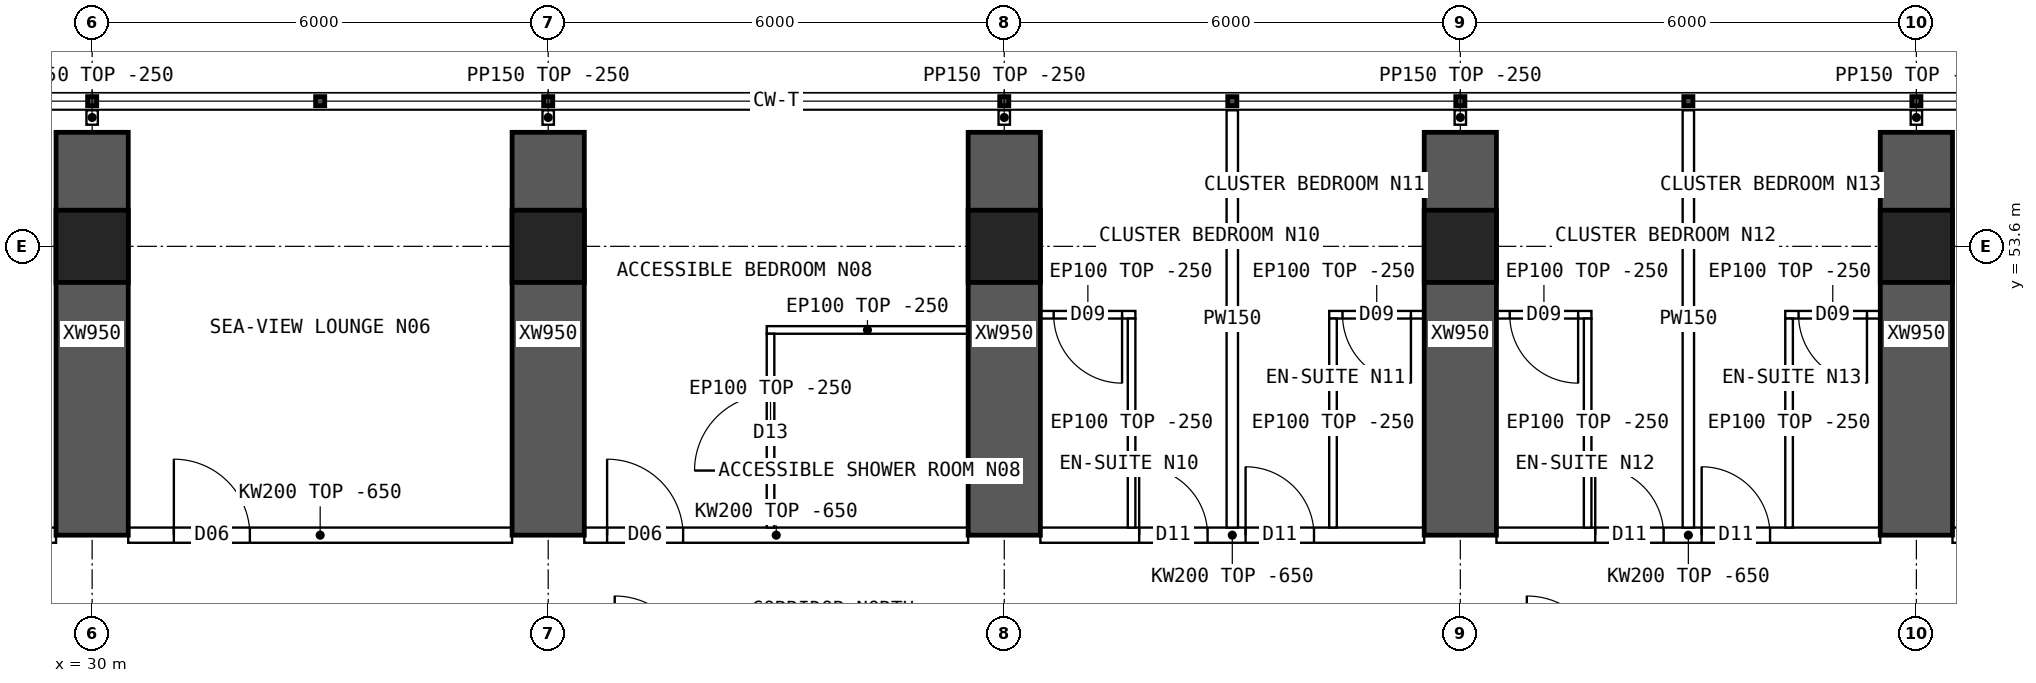
"""IFC4 building model, lengths in metres.
Left out: names, types, materials, properties, quantities, classifications, styles, units other than length and angle.
Written with IfcOpenShell. Run it as: python <this file> out.ifc"""

import sys

from ifc_helpers import new_model, si_unit, direction, frame, frame_2d, origin, origin_2d, place, context, subcontext, project, spatial, polyline, rectangle, hollow_rectangle, outline, extrude, element, fill, save


model = new_model("IFC4")
c1 = context("Model", 3, precision=1e-05, world=origin(), true_north=direction((0.0, 1.0)))
c2 = subcontext(c1, "Body", "Model", "MODEL_VIEW")
j1 = project(units=[si_unit("LENGTHUNIT", "METRE"), si_unit("PLANEANGLEUNIT", "RADIAN")], contexts=[c1])
p1 = place(None, origin())
s1 = spatial("IfcSite", under=j1, at=p1, CompositionType="ELEMENT")
p2 = place(p1, origin())
s2 = spatial("IfcBuilding", under=s1, at=p2, CompositionType="ELEMENT")
p3 = place(p2, frame((0.0, 0.0, 106.9)))
s3 = spatial("IfcBuildingStorey", under=s2, at=p3, CompositionType="ELEMENT", Elevation=106.9)
for number, where, z_axis, x_axis in (
    (1, (30.0, 53.6, 0.0), (0.0, 0.0, 1.0), (1.0, 0.0, 0.0)),
    (2, (36.0, 53.6, 0.0), (0.0, 0.0, 1.0), (1.0, 0.0, 0.0)),
    (3, (42.0, 53.6, 0.0), (0.0, 0.0, 1.0), (1.0, 0.0, 0.0)),
    (4, (48.0, 53.6, 0.0), (0.0, 0.0, 1.0), (1.0, 0.0, 0.0)),
    (5, (54.0, 53.6, 0.0), (0.0, 0.0, 1.0), (1.0, 0.0, 0.0)),
):
    element("IfcColumn", number, at=place(p3, frame(where, z_axis=z_axis, x_axis=x_axis)), inside=s3, PredefinedType="COLUMN", context=c2, shape_type="SweptSolid", body=[
        extrude(hollow_rectangle(XDim=0.95, YDim=0.95, WallThickness=0.095, at=origin_2d()), origin(), (0.0, 0.0, 1.0), 3.75),
    ])
for number, where, z_axis, x_axis in (
    (6, (30.0, 49.8, 0.0), (0.0, 0.0, 1.0), (0.0, 1.0, 0.0)),
    (7, (36.0, 49.8, 0.0), (0.0, 0.0, 1.0), (0.0, 1.0, 0.0)),
    (8, (42.0, 49.8, 0.0), (0.0, 0.0, 1.0), (0.0, 1.0, 0.0)),
    (9, (48.0, 49.8, 0.0), (0.0, 0.0, 1.0), (0.0, 1.0, 0.0)),
    (10, (54.0, 49.8, 0.0), (0.0, 0.0, 1.0), (0.0, 1.0, 0.0)),
):
    element("IfcWall", number, at=place(p3, frame(where, z_axis=z_axis, x_axis=x_axis)), inside=s3, PredefinedType="SHEAR", context=c2, shape_type="SweptSolid", body=[
        extrude(rectangle(XDim=5.3, YDim=0.95, at=frame_2d((2.65, 0.0))), origin(), (0.0, 0.0, 1.0), 3.75),
    ])
p4 = place(p3, frame((24.475, 49.8, 0.0), z_axis=(0.0, 0.0, 1.0), x_axis=(1.0, 0.0, 0.0)))
e11 = element("IfcWall", 11, at=p4, inside=s3, PredefinedType="SOLIDWALL", context=c2, shape_type="SweptSolid", body=[
    extrude(outline(polyline([(0.0, 0.0), (5.05, 0.0), (5.05, 3.1), (0.0, 3.1), (0.0, 0.0)])), frame((0.0, 0.1, 0.0), z_axis=(0.0, -1.0, 0.0), x_axis=(1.0, 0.0, 0.0)), (0.0, 0.0, 1.0), 0.2),
])
p5 = place(p4, frame((0.6, 0.0, 0.0)))
e12 = element("IfcOpeningElement", 12, at=p5, cuts=e11, PredefinedType="OPENING", context=c2, shape_type="SweptSolid", body=[
    extrude(rectangle(XDim=1.0, YDim=2.1, at=frame_2d((0.5, 1.05))), frame((0.0, 0.11, 0.0), z_axis=(0.0, -1.0, 0.0), x_axis=(1.0, 0.0, 0.0)), (0.0, 0.0, 1.0), 0.22),
])
p6 = place(p3, frame((30.475, 49.8, 0.0), z_axis=(0.0, 0.0, 1.0), x_axis=(1.0, 0.0, 0.0)))
e13 = element("IfcWall", 13, at=p6, inside=s3, PredefinedType="SOLIDWALL", context=c2, shape_type="SweptSolid", body=[
    extrude(outline(polyline([(0.0, 0.0), (5.05, 0.0), (5.05, 3.1), (0.0, 3.1), (0.0, 0.0)])), frame((0.0, 0.1, 0.0), z_axis=(0.0, -1.0, 0.0), x_axis=(1.0, 0.0, 0.0)), (0.0, 0.0, 1.0), 0.2),
])
p7 = place(p6, frame((0.6, 0.0, 0.0)))
e14 = element("IfcOpeningElement", 14, at=p7, cuts=e13, PredefinedType="OPENING", context=c2, shape_type="SweptSolid", body=[
    extrude(rectangle(XDim=1.0, YDim=2.1, at=frame_2d((0.5, 1.05))), frame((0.0, 0.11, 0.0), z_axis=(0.0, -1.0, 0.0), x_axis=(1.0, 0.0, 0.0)), (0.0, 0.0, 1.0), 0.22),
])
p8 = place(p3, frame((36.475, 49.8, 0.0), z_axis=(0.0, 0.0, 1.0), x_axis=(1.0, 0.0, 0.0)))
e15 = element("IfcWall", 15, at=p8, inside=s3, PredefinedType="SOLIDWALL", context=c2, shape_type="SweptSolid", body=[
    extrude(outline(polyline([(0.0, 0.0), (5.05, 0.0), (5.05, 3.1), (0.0, 3.1), (0.0, 0.0)])), frame((0.0, 0.1, 0.0), z_axis=(0.0, -1.0, 0.0), x_axis=(1.0, 0.0, 0.0)), (0.0, 0.0, 1.0), 0.2),
])
p9 = place(p8, frame((0.3, 0.0, 0.0)))
e16 = element("IfcOpeningElement", 16, at=p9, cuts=e15, PredefinedType="OPENING", context=c2, shape_type="SweptSolid", body=[
    extrude(rectangle(XDim=1.0, YDim=2.1, at=frame_2d((0.5, 1.05))), frame((0.0, 0.11, 0.0), z_axis=(0.0, -1.0, 0.0), x_axis=(1.0, 0.0, 0.0)), (0.0, 0.0, 1.0), 0.22),
])
p10 = place(p3, frame((42.475, 49.8, 0.0), z_axis=(0.0, 0.0, 1.0), x_axis=(1.0, 0.0, 0.0)))
e17 = element("IfcWall", 17, at=p10, inside=s3, PredefinedType="SOLIDWALL", context=c2, shape_type="SweptSolid", body=[
    extrude(outline(polyline([(0.0, 0.0), (5.05, 0.0), (5.05, 3.1), (0.0, 3.1), (0.0, 0.0)])), frame((0.0, 0.1, 0.0), z_axis=(0.0, -1.0, 0.0), x_axis=(1.0, 0.0, 0.0)), (0.0, 0.0, 1.0), 0.2),
])
p11 = place(p10, frame((1.3, 0.0, 0.0)))
e18 = element("IfcOpeningElement", 18, at=p11, cuts=e17, PredefinedType="OPENING", context=c2, shape_type="SweptSolid", body=[
    extrude(rectangle(XDim=0.9, YDim=2.1, at=frame_2d((0.45, 1.05))), frame((0.0, 0.11, 0.0), z_axis=(0.0, -1.0, 0.0), x_axis=(1.0, 0.0, 0.0)), (0.0, 0.0, 1.0), 0.22),
])
p12 = place(p10, frame((2.7, 0.0, 0.0)))
e19 = element("IfcOpeningElement", 19, at=p12, cuts=e17, PredefinedType="OPENING", context=c2, shape_type="SweptSolid", body=[
    extrude(rectangle(XDim=0.9, YDim=2.1, at=frame_2d((0.45, 1.05))), frame((0.0, 0.11, 0.0), z_axis=(0.0, -1.0, 0.0), x_axis=(1.0, 0.0, 0.0)), (0.0, 0.0, 1.0), 0.22),
])
p13 = place(p3, frame((48.475, 49.8, 0.0), z_axis=(0.0, 0.0, 1.0), x_axis=(1.0, 0.0, 0.0)))
e20 = element("IfcWall", 20, at=p13, inside=s3, PredefinedType="SOLIDWALL", context=c2, shape_type="SweptSolid", body=[
    extrude(outline(polyline([(0.0, 0.0), (5.05, 0.0), (5.05, 3.1), (0.0, 3.1), (0.0, 0.0)])), frame((0.0, 0.1, 0.0), z_axis=(0.0, -1.0, 0.0), x_axis=(1.0, 0.0, 0.0)), (0.0, 0.0, 1.0), 0.2),
])
p14 = place(p13, frame((1.3, 0.0, 0.0)))
e21 = element("IfcOpeningElement", 21, at=p14, cuts=e20, PredefinedType="OPENING", context=c2, shape_type="SweptSolid", body=[
    extrude(rectangle(XDim=0.9, YDim=2.1, at=frame_2d((0.45, 1.05))), frame((0.0, 0.11, 0.0), z_axis=(0.0, -1.0, 0.0), x_axis=(1.0, 0.0, 0.0)), (0.0, 0.0, 1.0), 0.22),
])
p15 = place(p13, frame((2.7, 0.0, 0.0)))
e22 = element("IfcOpeningElement", 22, at=p15, cuts=e20, PredefinedType="OPENING", context=c2, shape_type="SweptSolid", body=[
    extrude(rectangle(XDim=0.9, YDim=2.1, at=frame_2d((0.45, 1.05))), frame((0.0, 0.11, 0.0), z_axis=(0.0, -1.0, 0.0), x_axis=(1.0, 0.0, 0.0)), (0.0, 0.0, 1.0), 0.22),
])
p16 = place(p3, frame((54.475, 49.8, 0.0), z_axis=(0.0, 0.0, 1.0), x_axis=(1.0, 0.0, 0.0)))
e23 = element("IfcWall", 23, at=p16, inside=s3, PredefinedType="SOLIDWALL", context=c2, shape_type="SweptSolid", body=[
    extrude(outline(polyline([(0.0, 0.0), (5.05, 0.0), (5.05, 3.1), (0.0, 3.1), (0.0, 0.0)])), frame((0.0, 0.1, 0.0), z_axis=(0.0, -1.0, 0.0), x_axis=(1.0, 0.0, 0.0)), (0.0, 0.0, 1.0), 0.2),
])
p17 = place(p16, frame((0.6, 0.0, 0.0)))
e24 = element("IfcOpeningElement", 24, at=p17, cuts=e23, PredefinedType="OPENING", context=c2, shape_type="SweptSolid", body=[
    extrude(rectangle(XDim=1.0, YDim=2.1, at=frame_2d((0.5, 1.05))), frame((0.0, 0.11, 0.0), z_axis=(0.0, -1.0, 0.0), x_axis=(1.0, 0.0, 0.0)), (0.0, 0.0, 1.0), 0.22),
])
p18 = place(p3, frame((38.875, 52.5, 0.0), z_axis=(0.0, 0.0, 1.0), x_axis=(1.0, 0.0, 0.0)))
e25 = element("IfcWall", 25, at=p18, inside=s3, PredefinedType="PARTITIONING", context=c2, shape_type="SweptSolid", body=[
    extrude(rectangle(XDim=2.65, YDim=0.1, at=frame_2d((1.325, 0.0))), origin(), (0.0, 0.0, 1.0), 3.5),
])
p19 = place(p3, frame((38.925, 52.45, 0.0), z_axis=(0.0, 0.0, 1.0), x_axis=(0.0, -1.0, 0.0)))
e26 = element("IfcWall", 26, at=p19, inside=s3, PredefinedType="PARTITIONING", context=c2, shape_type="SweptSolid", body=[
    extrude(outline(polyline([(0.0, 0.0), (2.55, 0.0), (2.55, 3.1), (2.502, 3.1), (2.5, 3.5), (0.0, 3.5), (0.0, 0.0)])), frame((0.0, 0.05, 0.0), z_axis=(0.0, -1.0, 0.0), x_axis=(1.0, 0.0, 0.0)), (0.0, 0.0, 1.0), 0.1),
])
p20 = place(p19, frame((0.8, 0.0, 0.0)))
e27 = element("IfcOpeningElement", 27, at=p20, cuts=e26, PredefinedType="OPENING", context=c2, shape_type="SweptSolid", body=[
    extrude(rectangle(XDim=1.0, YDim=2.1, at=frame_2d((0.5, 1.05))), frame((0.0, 0.06, 0.0), z_axis=(0.0, -1.0, 0.0), x_axis=(1.0, 0.0, 0.0)), (0.0, 0.0, 1.0), 0.12),
])
p21 = place(p3, frame((45.0, 55.39, 0.0), z_axis=(0.0, 0.0, 1.0), x_axis=(0.0, -1.0, 0.0)))
e28 = element("IfcWall", 28, at=p21, inside=s3, PredefinedType="PARTITIONING", context=c2, shape_type="SweptSolid", body=[
    extrude(outline(polyline([(0.0, 0.0), (5.49, 0.0), (5.49, 3.1), (5.442, 3.1), (5.44, 3.5), (1.992, 3.5), (1.99, 3.1), (1.592, 3.1), (1.59, 3.5), (0.0, 3.5), (0.0, 0.0)])), frame((0.0, 0.075, 0.0), z_axis=(0.0, -1.0, 0.0), x_axis=(1.0, 0.0, 0.0)), (0.0, 0.0, 1.0), 0.15),
])
p22 = place(p3, frame((42.475, 52.7, 0.0), z_axis=(0.0, 0.0, 1.0), x_axis=(1.0, 0.0, 0.0)))
e29 = element("IfcWall", 29, at=p22, inside=s3, PredefinedType="PARTITIONING", context=c2, shape_type="SweptSolid", body=[
    extrude(rectangle(XDim=1.25, YDim=0.1, at=frame_2d((0.625, 0.0))), origin(), (0.0, 0.0, 1.0), 3.5),
])
p23 = place(p22, frame((0.175, 0.0, 0.0)))
e30 = element("IfcOpeningElement", 30, at=p23, cuts=e29, PredefinedType="OPENING", context=c2, shape_type="SweptSolid", body=[
    extrude(rectangle(XDim=0.9, YDim=2.1, at=frame_2d((0.45, 1.05))), frame((0.0, 0.06, 0.0), z_axis=(0.0, -1.0, 0.0), x_axis=(1.0, 0.0, 0.0)), (0.0, 0.0, 1.0), 0.12),
])
p24 = place(p3, frame((43.675, 52.65, 0.0), z_axis=(0.0, 0.0, 1.0), x_axis=(0.0, -1.0, 0.0)))
e31 = element("IfcWall", 31, at=p24, inside=s3, PredefinedType="PARTITIONING", context=c2, shape_type="SweptSolid", body=[
    extrude(outline(polyline([(0.0, 0.0), (2.75, 0.0), (2.75, 3.1), (2.702, 3.1), (2.7, 3.5), (0.0, 3.5), (0.0, 0.0)])), frame((0.0, 0.05, 0.0), z_axis=(0.0, -1.0, 0.0), x_axis=(1.0, 0.0, 0.0)), (0.0, 0.0, 1.0), 0.1),
])
p25 = place(p3, frame((46.275, 52.7, 0.0), z_axis=(0.0, 0.0, 1.0), x_axis=(1.0, 0.0, 0.0)))
e32 = element("IfcWall", 32, at=p25, inside=s3, PredefinedType="PARTITIONING", context=c2, shape_type="SweptSolid", body=[
    extrude(rectangle(XDim=1.25, YDim=0.1, at=frame_2d((0.625, 0.0))), origin(), (0.0, 0.0, 1.0), 3.5),
])
p26 = place(p25, frame((0.175, 0.0, 0.0)))
e33 = element("IfcOpeningElement", 33, at=p26, cuts=e32, PredefinedType="OPENING", context=c2, shape_type="SweptSolid", body=[
    extrude(rectangle(XDim=0.9, YDim=2.1, at=frame_2d((0.45, 1.05))), frame((0.0, 0.06, 0.0), z_axis=(0.0, -1.0, 0.0), x_axis=(1.0, 0.0, 0.0)), (0.0, 0.0, 1.0), 0.12),
])
p27 = place(p3, frame((46.325, 52.65, 0.0), z_axis=(0.0, 0.0, 1.0), x_axis=(0.0, -1.0, 0.0)))
e34 = element("IfcWall", 34, at=p27, inside=s3, PredefinedType="PARTITIONING", context=c2, shape_type="SweptSolid", body=[
    extrude(outline(polyline([(0.0, 0.0), (2.75, 0.0), (2.75, 3.1), (2.702, 3.1), (2.7, 3.5), (0.0, 3.5), (0.0, 0.0)])), frame((0.0, 0.05, 0.0), z_axis=(0.0, -1.0, 0.0), x_axis=(1.0, 0.0, 0.0)), (0.0, 0.0, 1.0), 0.1),
])
p28 = place(p3, frame((51.0, 55.39, 0.0), z_axis=(0.0, 0.0, 1.0), x_axis=(0.0, -1.0, 0.0)))
e35 = element("IfcWall", 35, at=p28, inside=s3, PredefinedType="PARTITIONING", context=c2, shape_type="SweptSolid", body=[
    extrude(outline(polyline([(0.0, 0.0), (5.49, 0.0), (5.49, 3.1), (5.442, 3.1), (5.44, 3.5), (1.992, 3.5), (1.99, 3.1), (1.592, 3.1), (1.59, 3.5), (0.0, 3.5), (0.0, 0.0)])), frame((0.0, 0.075, 0.0), z_axis=(0.0, -1.0, 0.0), x_axis=(1.0, 0.0, 0.0)), (0.0, 0.0, 1.0), 0.15),
])
p29 = place(p3, frame((48.475, 52.7, 0.0), z_axis=(0.0, 0.0, 1.0), x_axis=(1.0, 0.0, 0.0)))
e36 = element("IfcWall", 36, at=p29, inside=s3, PredefinedType="PARTITIONING", context=c2, shape_type="SweptSolid", body=[
    extrude(rectangle(XDim=1.25, YDim=0.1, at=frame_2d((0.625, 0.0))), origin(), (0.0, 0.0, 1.0), 3.5),
])
p30 = place(p29, frame((0.175, 0.0, 0.0)))
e37 = element("IfcOpeningElement", 37, at=p30, cuts=e36, PredefinedType="OPENING", context=c2, shape_type="SweptSolid", body=[
    extrude(rectangle(XDim=0.9, YDim=2.1, at=frame_2d((0.45, 1.05))), frame((0.0, 0.06, 0.0), z_axis=(0.0, -1.0, 0.0), x_axis=(1.0, 0.0, 0.0)), (0.0, 0.0, 1.0), 0.12),
])
p31 = place(p3, frame((49.675, 52.65, 0.0), z_axis=(0.0, 0.0, 1.0), x_axis=(0.0, -1.0, 0.0)))
e38 = element("IfcWall", 38, at=p31, inside=s3, PredefinedType="PARTITIONING", context=c2, shape_type="SweptSolid", body=[
    extrude(outline(polyline([(0.0, 0.0), (2.75, 0.0), (2.75, 3.1), (2.702, 3.1), (2.7, 3.5), (0.0, 3.5), (0.0, 0.0)])), frame((0.0, 0.05, 0.0), z_axis=(0.0, -1.0, 0.0), x_axis=(1.0, 0.0, 0.0)), (0.0, 0.0, 1.0), 0.1),
])
p32 = place(p3, frame((52.275, 52.7, 0.0), z_axis=(0.0, 0.0, 1.0), x_axis=(1.0, 0.0, 0.0)))
e39 = element("IfcWall", 39, at=p32, inside=s3, PredefinedType="PARTITIONING", context=c2, shape_type="SweptSolid", body=[
    extrude(rectangle(XDim=1.25, YDim=0.1, at=frame_2d((0.625, 0.0))), origin(), (0.0, 0.0, 1.0), 3.5),
])
p33 = place(p32, frame((0.175, 0.0, 0.0)))
e40 = element("IfcOpeningElement", 40, at=p33, cuts=e39, PredefinedType="OPENING", context=c2, shape_type="SweptSolid", body=[
    extrude(rectangle(XDim=0.9, YDim=2.1, at=frame_2d((0.45, 1.05))), frame((0.0, 0.06, 0.0), z_axis=(0.0, -1.0, 0.0), x_axis=(1.0, 0.0, 0.0)), (0.0, 0.0, 1.0), 0.12),
])
p34 = place(p3, frame((52.325, 52.65, 0.0), z_axis=(0.0, 0.0, 1.0), x_axis=(0.0, -1.0, 0.0)))
e41 = element("IfcWall", 41, at=p34, inside=s3, PredefinedType="PARTITIONING", context=c2, shape_type="SweptSolid", body=[
    extrude(outline(polyline([(0.0, 0.0), (2.75, 0.0), (2.75, 3.1), (2.702, 3.1), (2.7, 3.5), (0.0, 3.5), (0.0, 0.0)])), frame((0.0, 0.05, 0.0), z_axis=(0.0, -1.0, 0.0), x_axis=(1.0, 0.0, 0.0)), (0.0, 0.0, 1.0), 0.1),
])
for number, where, z_axis, x_axis in (
    (42, (30.0, 55.2, 0.0), (0.0, 0.0, 1.0), (0.0, 1.0, 0.0)),
    (43, (36.0, 55.2, 0.0), (0.0, 0.0, 1.0), (0.0, 1.0, 0.0)),
    (44, (42.0, 55.2, 0.0), (0.0, 0.0, 1.0), (0.0, 1.0, 0.0)),
    (45, (48.0, 55.2, 0.0), (0.0, 0.0, 1.0), (0.0, 1.0, 0.0)),
    (46, (54.0, 55.2, 0.0), (0.0, 0.0, 1.0), (0.0, 1.0, 0.0)),
):
    element("IfcWall", number, at=place(p3, frame(where, z_axis=z_axis, x_axis=x_axis)), inside=s3, PredefinedType="PARTITIONING", context=c2, shape_type="SweptSolid", body=[
        extrude(rectangle(XDim=0.19, YDim=0.15, at=frame_2d((0.095, 0.0))), origin(), (0.0, 0.0, 1.0), 3.5),
    ])
p35 = place(p7, origin())
e47 = element("IfcDoor", 47, at=p35, inside=s3, OperationType="SINGLE_SWING_LEFT", PredefinedType="DOOR", context=c2, shape_type="SweptSolid", body=[
    extrude(rectangle(XDim=1.0, YDim=2.1, at=frame_2d((0.5, 1.05))), frame((0.0, 0.025, 0.0), z_axis=(0.0, -1.0, 0.0), x_axis=(1.0, 0.0, 0.0)), (0.0, 0.0, 1.0), 0.05),
])
fill(e14, e47)
p36 = place(p20, origin())
e48 = element("IfcDoor", 48, at=p36, inside=s3, OperationType="SINGLE_SWING_RIGHT", PredefinedType="DOOR", context=c2, shape_type="SweptSolid", body=[
    extrude(rectangle(XDim=1.0, YDim=2.1, at=frame_2d((0.5, 1.05))), frame((0.0, 0.025, 0.0), z_axis=(0.0, -1.0, 0.0), x_axis=(1.0, 0.0, 0.0)), (0.0, 0.0, 1.0), 0.05),
])
fill(e27, e48)
p37 = place(p9, origin())
e49 = element("IfcDoor", 49, at=p37, inside=s3, OperationType="SINGLE_SWING_LEFT", PredefinedType="DOOR", context=c2, shape_type="SweptSolid", body=[
    extrude(rectangle(XDim=1.0, YDim=2.1, at=frame_2d((0.5, 1.05))), frame((0.0, 0.025, 0.0), z_axis=(0.0, -1.0, 0.0), x_axis=(1.0, 0.0, 0.0)), (0.0, 0.0, 1.0), 0.05),
])
fill(e16, e49)
p38 = place(p23, origin())
e50 = element("IfcDoor", 50, at=p38, inside=s3, OperationType="SINGLE_SWING_RIGHT", PredefinedType="DOOR", context=c2, shape_type="SweptSolid", body=[
    extrude(rectangle(XDim=0.9, YDim=2.1, at=frame_2d((0.45, 1.05))), frame((0.0, 0.025, 0.0), z_axis=(0.0, -1.0, 0.0), x_axis=(1.0, 0.0, 0.0)), (0.0, 0.0, 1.0), 0.05),
])
fill(e30, e50)
p39 = place(p11, origin())
e51 = element("IfcDoor", 51, at=p39, inside=s3, OperationType="SINGLE_SWING_LEFT", PredefinedType="DOOR", context=c2, shape_type="SweptSolid", body=[
    extrude(rectangle(XDim=0.9, YDim=2.1, at=frame_2d((0.45, 1.05))), frame((0.0, 0.025, 0.0), z_axis=(0.0, -1.0, 0.0), x_axis=(1.0, 0.0, 0.0)), (0.0, 0.0, 1.0), 0.05),
])
fill(e18, e51)
p40 = place(p26, origin())
e52 = element("IfcDoor", 52, at=p40, inside=s3, OperationType="SINGLE_SWING_RIGHT", PredefinedType="DOOR", context=c2, shape_type="SweptSolid", body=[
    extrude(rectangle(XDim=0.9, YDim=2.1, at=frame_2d((0.45, 1.05))), frame((0.0, 0.025, 0.0), z_axis=(0.0, -1.0, 0.0), x_axis=(1.0, 0.0, 0.0)), (0.0, 0.0, 1.0), 0.05),
])
fill(e33, e52)
p41 = place(p12, origin())
e53 = element("IfcDoor", 53, at=p41, inside=s3, OperationType="SINGLE_SWING_LEFT", PredefinedType="DOOR", context=c2, shape_type="SweptSolid", body=[
    extrude(rectangle(XDim=0.9, YDim=2.1, at=frame_2d((0.45, 1.05))), frame((0.0, 0.025, 0.0), z_axis=(0.0, -1.0, 0.0), x_axis=(1.0, 0.0, 0.0)), (0.0, 0.0, 1.0), 0.05),
])
fill(e19, e53)
p42 = place(p30, origin())
e54 = element("IfcDoor", 54, at=p42, inside=s3, OperationType="SINGLE_SWING_RIGHT", PredefinedType="DOOR", context=c2, shape_type="SweptSolid", body=[
    extrude(rectangle(XDim=0.9, YDim=2.1, at=frame_2d((0.45, 1.05))), frame((0.0, 0.025, 0.0), z_axis=(0.0, -1.0, 0.0), x_axis=(1.0, 0.0, 0.0)), (0.0, 0.0, 1.0), 0.05),
])
fill(e37, e54)
p43 = place(p14, origin())
e55 = element("IfcDoor", 55, at=p43, inside=s3, OperationType="SINGLE_SWING_LEFT", PredefinedType="DOOR", context=c2, shape_type="SweptSolid", body=[
    extrude(rectangle(XDim=0.9, YDim=2.1, at=frame_2d((0.45, 1.05))), frame((0.0, 0.025, 0.0), z_axis=(0.0, -1.0, 0.0), x_axis=(1.0, 0.0, 0.0)), (0.0, 0.0, 1.0), 0.05),
])
fill(e21, e55)
p44 = place(p33, origin())
e56 = element("IfcDoor", 56, at=p44, inside=s3, OperationType="SINGLE_SWING_RIGHT", PredefinedType="DOOR", context=c2, shape_type="SweptSolid", body=[
    extrude(rectangle(XDim=0.9, YDim=2.1, at=frame_2d((0.45, 1.05))), frame((0.0, 0.025, 0.0), z_axis=(0.0, -1.0, 0.0), x_axis=(1.0, 0.0, 0.0)), (0.0, 0.0, 1.0), 0.05),
])
fill(e40, e56)
p45 = place(p15, origin())
e57 = element("IfcDoor", 57, at=p45, inside=s3, OperationType="SINGLE_SWING_LEFT", PredefinedType="DOOR", context=c2, shape_type="SweptSolid", body=[
    extrude(rectangle(XDim=0.9, YDim=2.1, at=frame_2d((0.45, 1.05))), frame((0.0, 0.025, 0.0), z_axis=(0.0, -1.0, 0.0), x_axis=(1.0, 0.0, 0.0)), (0.0, 0.0, 1.0), 0.05),
])
fill(e22, e57)
save(model, sys.argv[1])
